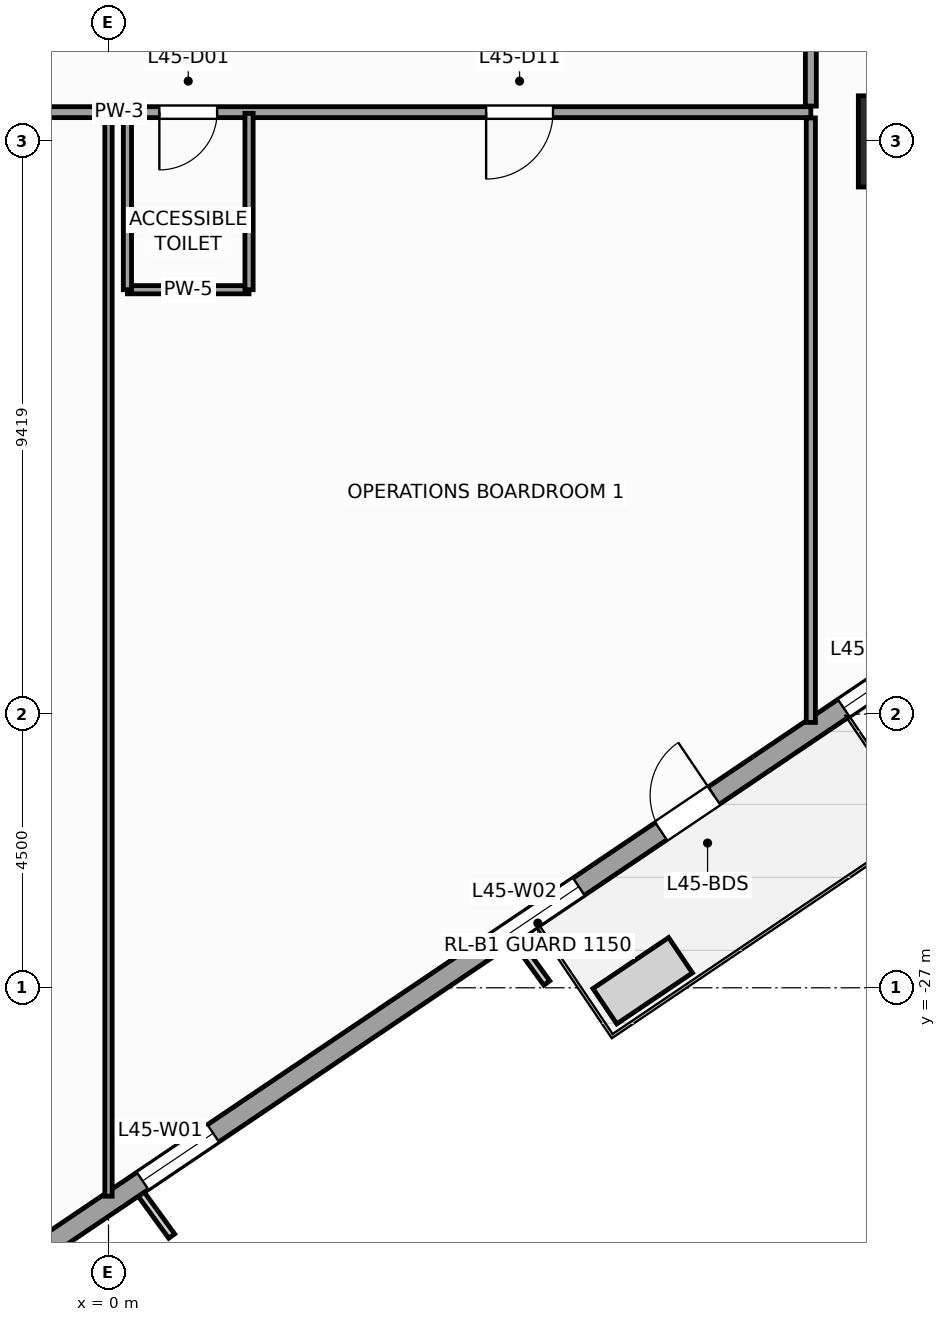
"""IFC4 building model, lengths in metres.
Left out: names, types, materials, properties, quantities, classifications, styles, units other than length and angle.
Written with IfcOpenShell. Run it as: python <this file> out.ifc"""

import sys

from ifc_helpers import new_model, si_unit, direction, frame, frame_2d, origin, origin_2d, place, context, subcontext, project, spatial, rectangle, extrude, source, transform, mapped, element, fill, save


model = new_model("IFC4")
c1 = context("Model", 3, precision=1e-05, world=origin(), true_north=direction((0.0, 1.0)))
c2 = subcontext(c1, "Body", "Model", "MODEL_VIEW")
j1 = project(units=[si_unit("LENGTHUNIT", "METRE"), si_unit("PLANEANGLEUNIT", "RADIAN")], contexts=[c1])
p1 = place(None, origin())
s1 = spatial("IfcSite", under=j1, at=p1, CompositionType="ELEMENT")
p2 = place(p1, origin())
s2 = spatial("IfcBuilding", under=s1, at=p2, CompositionType="ELEMENT")
p3 = place(p2, frame((0.0, 0.0, 188.4)))
s3 = spatial("IfcBuildingStorey", under=s2, at=p3, CompositionType="ELEMENT", Elevation=188.4)
m1 = source(origin(), c2, "Body", "SweptSolid", [
    extrude(rectangle(XDim=1.5, YDim=1.5, at=origin_2d()), origin(), (0.0, 0.0, 1.0), 4.0),
])
p4 = place(p3, frame((13.081, -13.081, 0.0), z_axis=(0.0, 0.0, 1.0), x_axis=(1.0, 0.0, 0.0)))
e1 = element("IfcColumn", 1, at=p4, inside=s3, PredefinedType="COLUMN", context=c2, shape_type="MappedRepresentation", body=[
    mapped(m1, transform((0.0, 0.0, 0.0), scale=1.0)),
])
p5 = place(p3, frame((-2.972, -32.558, 0.0), z_axis=(0.0, 0.0, 1.0), x_axis=(0.829036218961, 0.559194910251, 0.0)))
e2 = element("IfcWall", 2, at=p5, inside=s3, PredefinedType="STANDARD", context=c2, shape_type="SweptSolid", body=[
    extrude(rectangle(XDim=41.34, YDim=0.34, at=frame_2d((20.67, 0.0))), origin(), (0.0, 0.0, 1.0), 3.04),
])
p6 = place(p5, frame((14.545, 0.0, 0.0)))
e3 = element("IfcOpeningElement", 3, at=p6, cuts=e2, PredefinedType="OPENING", context=c2, shape_type="SweptSolid", body=[
    extrude(rectangle(XDim=1.05, YDim=2.25, at=frame_2d((0.525, 1.125))), frame((0.0, 0.18, 0.0), z_axis=(0.0, -1.0, 0.0), x_axis=(1.0, 0.0, 0.0)), (0.0, 0.0, 1.0), 0.36),
])
p7 = place(p5, frame((4.261, 0.0, 0.56)))
e4 = element("IfcOpeningElement", 4, at=p7, cuts=e2, PredefinedType="OPENING", context=c2, shape_type="SweptSolid", body=[
    extrude(rectangle(XDim=1.4, YDim=2.4, at=frame_2d((0.7, 1.2))), frame((0.0, 0.18, 0.0), z_axis=(0.0, -1.0, 0.0), x_axis=(1.0, 0.0, 0.0)), (0.0, 0.0, 1.0), 0.36),
])
p8 = place(p5, frame((11.064, 0.0, 0.61)))
e5 = element("IfcOpeningElement", 5, at=p8, cuts=e2, PredefinedType="OPENING", context=c2, shape_type="SweptSolid", body=[
    extrude(rectangle(XDim=1.85, YDim=2.35, at=frame_2d((0.925, 1.175))), frame((0.0, 0.18, 0.0), z_axis=(0.0, -1.0, 0.0), x_axis=(1.0, 0.0, 0.0)), (0.0, 0.0, 1.0), 0.36),
])
p9 = place(p5, frame((18.168, 0.0, 0.61)))
e6 = element("IfcOpeningElement", 6, at=p9, cuts=e2, PredefinedType="OPENING", context=c2, shape_type="SweptSolid", body=[
    extrude(rectangle(XDim=1.85, YDim=2.35, at=frame_2d((0.925, 1.175))), frame((0.0, 0.18, 0.0), z_axis=(0.0, -1.0, 0.0), x_axis=(1.0, 0.0, 0.0)), (0.0, 0.0, 1.0), 0.36),
])
p10 = place(p5, frame((27.186, 0.0, 0.61)))
e7 = element("IfcOpeningElement", 7, at=p10, cuts=e2, PredefinedType="OPENING", context=c2, shape_type="SweptSolid", body=[
    extrude(rectangle(XDim=1.85, YDim=2.35, at=frame_2d((0.925, 1.175))), frame((0.0, 0.18, 0.0), z_axis=(0.0, -1.0, 0.0), x_axis=(1.0, 0.0, 0.0)), (0.0, 0.0, 1.0), 0.36),
])
p11 = place(p5, frame((34.852, 0.0, 0.56)))
e8 = element("IfcOpeningElement", 8, at=p11, cuts=e2, PredefinedType="OPENING", context=c2, shape_type="SweptSolid", body=[
    extrude(rectangle(XDim=1.4, YDim=2.4, at=frame_2d((0.7, 1.2))), frame((0.0, 0.18, 0.0), z_axis=(0.0, -1.0, 0.0), x_axis=(1.0, 0.0, 0.0)), (0.0, 0.0, 1.0), 0.36),
])
p12 = place(p3, frame((-10.45, -12.6, 0.0), z_axis=(0.0, 0.0, 1.0), x_axis=(1.0, 0.0, 0.0)))
e9 = element("IfcWall", 9, at=p12, inside=s3, PredefinedType="PARTITIONING", context=c2, shape_type="SweptSolid", body=[
    extrude(rectangle(XDim=22.0, YDim=0.18, at=frame_2d((11.0, 0.0))), origin(), (0.0, 0.0, 1.0), 3.74),
])
p13 = place(p12, frame((11.286, 0.0, 0.0)))
e10 = element("IfcOpeningElement", 10, at=p13, cuts=e9, PredefinedType="OPENING", context=c2, shape_type="SweptSolid", body=[
    extrude(rectangle(XDim=0.95, YDim=2.1, at=frame_2d((0.475, 1.05))), frame((0.0, 0.1, 0.0), z_axis=(0.0, -1.0, 0.0), x_axis=(1.0, 0.0, 0.0)), (0.0, 0.0, 1.0), 0.2),
])
p14 = place(p12, frame((4.839, 0.0, 0.0)))
e11 = element("IfcOpeningElement", 11, at=p14, cuts=e9, PredefinedType="OPENING", context=c2, shape_type="SweptSolid", body=[
    extrude(rectangle(XDim=1.1, YDim=2.2, at=frame_2d((0.55, 1.1))), frame((0.0, 0.1, 0.0), z_axis=(0.0, -1.0, 0.0), x_axis=(1.0, 0.0, 0.0)), (0.0, 0.0, 1.0), 0.2),
])
p15 = place(p12, frame((16.66, 0.0, 0.0)))
e12 = element("IfcOpeningElement", 12, at=p15, cuts=e9, PredefinedType="OPENING", context=c2, shape_type="SweptSolid", body=[
    extrude(rectangle(XDim=1.1, YDim=2.2, at=frame_2d((0.55, 1.1))), frame((0.0, 0.1, 0.0), z_axis=(0.0, -1.0, 0.0), x_axis=(1.0, 0.0, 0.0)), (0.0, 0.0, 1.0), 0.2),
])
p16 = place(p3, frame((11.55, -12.5, 0.0), z_axis=(0.0, 0.0, 1.0), x_axis=(0.0, 1.0, 0.0)))
e13 = element("IfcWall", 13, at=p16, inside=s3, PredefinedType="PARTITIONING", context=c2, shape_type="SweptSolid", body=[
    extrude(rectangle(XDim=14.1, YDim=0.18, at=frame_2d((7.05, 0.0))), origin(), (0.0, 0.0, 1.0), 3.74),
])
p17 = place(p16, frame((9.539, 0.0, 0.0)))
e14 = element("IfcOpeningElement", 14, at=p17, cuts=e13, PredefinedType="OPENING", context=c2, shape_type="SweptSolid", body=[
    extrude(rectangle(XDim=0.95, YDim=2.1, at=frame_2d((0.475, 1.05))), frame((0.0, 0.1, 0.0), z_axis=(0.0, -1.0, 0.0), x_axis=(1.0, 0.0, 0.0)), (0.0, 0.0, 1.0), 0.2),
])
p18 = place(p16, frame((12.061, 0.0, 0.0)))
e15 = element("IfcOpeningElement", 15, at=p18, cuts=e13, PredefinedType="OPENING", context=c2, shape_type="SweptSolid", body=[
    extrude(rectangle(XDim=1.1, YDim=2.2, at=frame_2d((0.55, 1.1))), frame((0.0, 0.1, 0.0), z_axis=(0.0, -1.0, 0.0), x_axis=(1.0, 0.0, 0.0)), (0.0, 0.0, 1.0), 0.2),
])
p19 = place(p16, frame((4.065, 0.0, 0.0)))
e16 = element("IfcOpeningElement", 16, at=p19, cuts=e13, PredefinedType="OPENING", context=c2, shape_type="SweptSolid", body=[
    extrude(rectangle(XDim=1.1, YDim=2.2, at=frame_2d((0.55, 1.1))), frame((0.0, 0.1, 0.0), z_axis=(0.0, -1.0, 0.0), x_axis=(1.0, 0.0, 0.0)), (0.0, 0.0, 1.0), 0.2),
])
p20 = place(p3, frame((0.0, -30.427, 0.0), z_axis=(0.0, 0.0, 1.0), x_axis=(0.0, 1.0, 0.0)))
e17 = element("IfcWall", 17, at=p20, inside=s3, PredefinedType="PARTITIONING", context=c2, shape_type="SweptSolid", body=[
    extrude(rectangle(XDim=17.732, YDim=0.12, at=frame_2d((8.866, 0.0))), origin(), (0.0, 0.0, 1.0), 3.74),
])
p21 = place(p3, frame((11.55, -22.636, 0.0), z_axis=(0.0, 0.0, 1.0), x_axis=(0.0, 1.0, 0.0)))
e18 = element("IfcWall", 18, at=p21, inside=s3, PredefinedType="PARTITIONING", context=c2, shape_type="SweptSolid", body=[
    extrude(rectangle(XDim=9.941, YDim=0.15, at=frame_2d((4.971, 0.0))), origin(), (0.0, 0.0, 1.0), 3.74),
])
p22 = place(p3, frame((0.311, -15.52, 0.0), z_axis=(0.0, 0.0, 1.0), x_axis=(1.0, 0.0, 0.0)))
e19 = element("IfcWall", 19, at=p22, inside=s3, PredefinedType="PARTITIONING", context=c2, shape_type="SweptSolid", body=[
    extrude(rectangle(XDim=2.0, YDim=0.135, at=frame_2d((1.0, 0.0))), origin(), (0.0, 0.0, 1.0), 3.74),
])
for number, where, z_axis, x_axis in (
    (20, (2.311, -15.52, 0.0), (0.0, 0.0, 1.0), (0.0, 1.0, 0.0)),
    (21, (0.311, -15.52, 0.0), (0.0, 0.0, 1.0), (0.0, 1.0, 0.0)),
):
    element("IfcWall", number, at=place(p3, frame(where, z_axis=z_axis, x_axis=x_axis)), inside=s3, PredefinedType="PARTITIONING", context=c2, shape_type="SweptSolid", body=[
        extrude(rectangle(XDim=2.9, YDim=0.135, at=frame_2d((1.45, 0.0))), origin(), (0.0, 0.0, 1.0), 3.74),
    ])
m2 = source(origin(), c2, "Body", "SweptSolid", [
    extrude(rectangle(XDim=1.05, YDim=2.25, at=frame_2d((0.525, 1.125))), frame((0.0, 0.025, 0.0), z_axis=(0.0, -1.0, 0.0), x_axis=(1.0, 0.0, 0.0)), (0.0, 0.0, 1.0), 0.05),
])
p23 = place(p6, origin())
e22 = element("IfcDoor", 22, at=p23, inside=s3, OperationType="SINGLE_SWING_RIGHT", PredefinedType="DOOR", context=c2, shape_type="MappedRepresentation", body=[
    mapped(m2, transform((0.0, 0.0, 0.0), scale=1.0)),
])
fill(e3, e22)
m3 = source(origin(), c2, "Body", "SweptSolid", [
    extrude(rectangle(XDim=1.4, YDim=2.4, at=frame_2d((0.7, 1.2))), frame((0.0, 0.03, 0.0), z_axis=(0.0, -1.0, 0.0), x_axis=(1.0, 0.0, 0.0)), (0.0, 0.0, 1.0), 0.06),
])
p24 = place(p7, origin())
e23 = element("IfcWindow", 23, at=p24, inside=s3, PartitioningType="SINGLE_PANEL", PredefinedType="WINDOW", context=c2, shape_type="MappedRepresentation", body=[
    mapped(m3, transform((0.0, 0.0, 0.0), scale=1.0)),
])
fill(e4, e23)
m4 = source(origin(), c2, "Body", "SweptSolid", [
    extrude(rectangle(XDim=1.85, YDim=2.35, at=frame_2d((0.925, 1.175))), frame((0.0, 0.03, 0.0), z_axis=(0.0, -1.0, 0.0), x_axis=(1.0, 0.0, 0.0)), (0.0, 0.0, 1.0), 0.06),
])
p25 = place(p8, origin())
e24 = element("IfcWindow", 24, at=p25, inside=s3, PartitioningType="SINGLE_PANEL", PredefinedType="WINDOW", context=c2, shape_type="MappedRepresentation", body=[
    mapped(m4, transform((0.0, 0.0, 0.0), scale=1.0)),
])
fill(e5, e24)
p26 = place(p9, origin())
e25 = element("IfcWindow", 25, at=p26, inside=s3, PartitioningType="SINGLE_PANEL", PredefinedType="WINDOW", context=c2, shape_type="MappedRepresentation", body=[
    mapped(m4, transform((0.0, 0.0, 0.0), scale=1.0)),
])
fill(e6, e25)
m5 = source(origin(), c2, "Body", "SweptSolid", [
    extrude(rectangle(XDim=0.95, YDim=2.1, at=frame_2d((0.475, 1.05))), frame((0.0, 0.025, 0.0), z_axis=(0.0, -1.0, 0.0), x_axis=(1.0, 0.0, 0.0)), (0.0, 0.0, 1.0), 0.05),
])
p27 = place(p13, frame((0.95, 0.0, 0.0), z_axis=(0.0, 0.0, 1.0), x_axis=(-1.0, 0.0, 0.0)))
e26 = element("IfcDoor", 26, at=p27, inside=s3, OperationType="SINGLE_SWING_LEFT", PredefinedType="DOOR", context=c2, shape_type="MappedRepresentation", body=[
    mapped(m5, transform((0.0, 0.0, 0.0), scale=1.0)),
])
fill(e10, e26)
m6 = source(origin(), c2, "Body", "SweptSolid", [
    extrude(rectangle(XDim=1.1, YDim=2.2, at=frame_2d((0.55, 1.1))), frame((0.0, 0.025, 0.0), z_axis=(0.0, -1.0, 0.0), x_axis=(1.0, 0.0, 0.0)), (0.0, 0.0, 1.0), 0.05),
])
p28 = place(p15, frame((1.1, 0.0, 0.0), z_axis=(0.0, 0.0, 1.0), x_axis=(-1.0, 0.0, 0.0)))
e27 = element("IfcDoor", 27, at=p28, inside=s3, OperationType="SINGLE_SWING_LEFT", PredefinedType="DOOR", context=c2, shape_type="MappedRepresentation", body=[
    mapped(m6, transform((0.0, 0.0, 0.0), scale=1.0)),
])
fill(e12, e27)
save(model, sys.argv[1])
